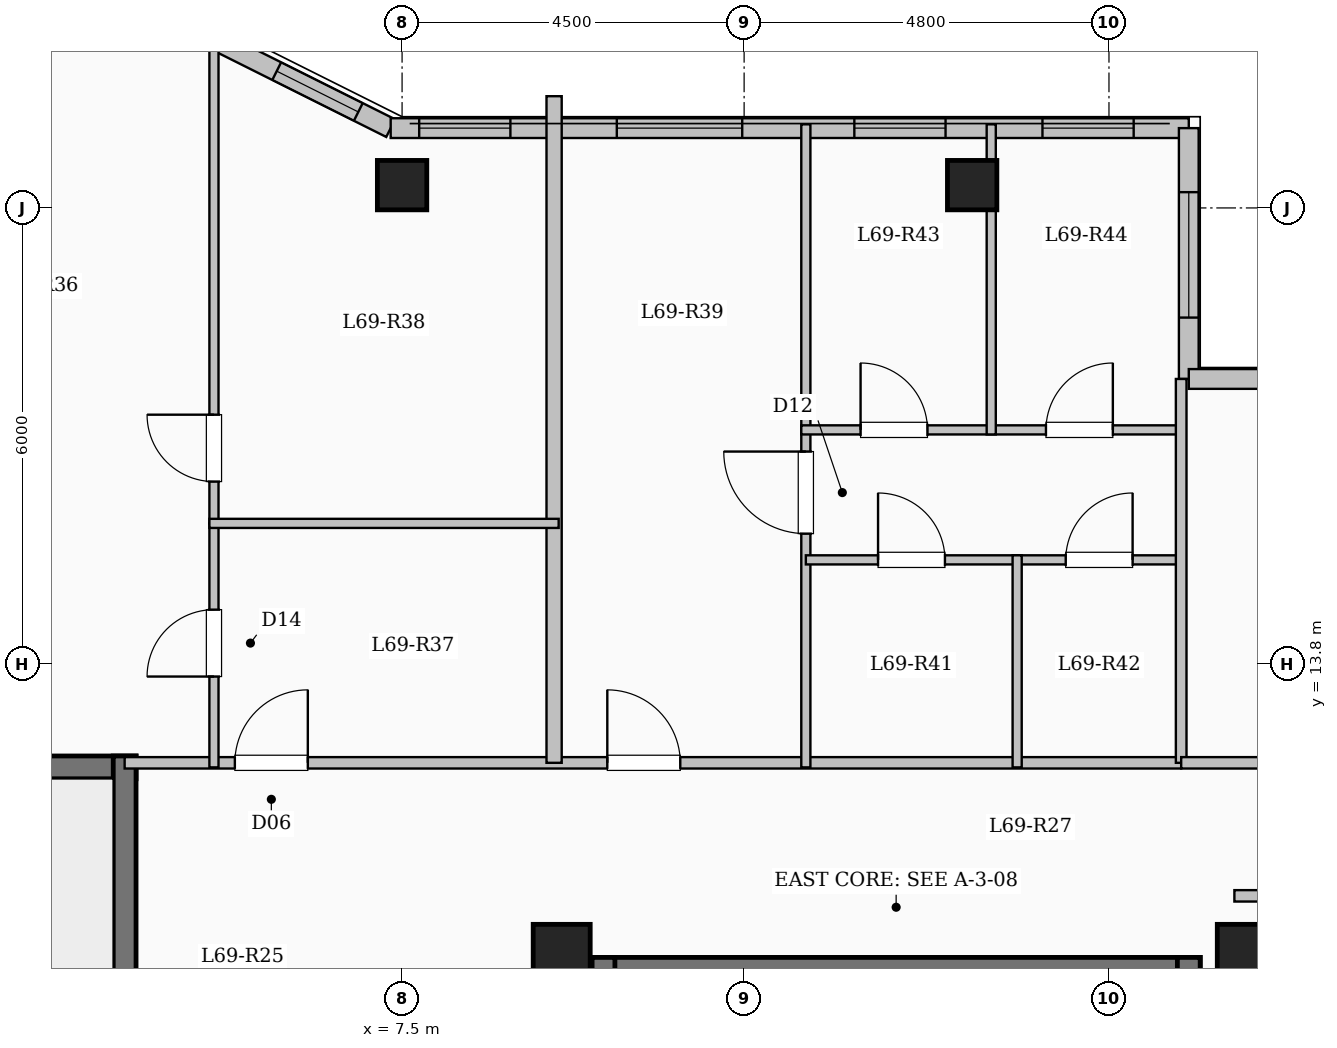
"""IFC4 building model, lengths in metres.
Left out: names, types, materials, properties, quantities, classifications, styles, units other than length and angle.
Written with IfcOpenShell. Run it as: python <this file> out.ifc"""

import sys

from ifc_helpers import new_model, si_unit, direction, frame, frame_2d, origin, origin_2d, place, context, subcontext, project, spatial, rectangle, extrude, element, fill, save


model = new_model("IFC4")
c1 = context("Model", 3, precision=1e-05, world=origin(), true_north=direction((0.0, 1.0)))
c2 = subcontext(c1, "Body", "Model", "MODEL_VIEW")
j1 = project(units=[si_unit("LENGTHUNIT", "METRE"), si_unit("PLANEANGLEUNIT", "RADIAN")], contexts=[c1])
p1 = place(None, origin())
s1 = spatial("IfcSite", under=j1, at=p1, CompositionType="ELEMENT")
p2 = place(p1, origin())
s2 = spatial("IfcBuilding", under=s1, at=p2, CompositionType="ELEMENT")
p3 = place(p2, frame((0.0, 0.0, 254.9)))
s3 = spatial("IfcBuildingStorey", under=s2, at=p3, CompositionType="ELEMENT", Elevation=254.9)
for number, where, z_axis, x_axis in (
    (1, (9.6, 10.0, 0.0), (0.0, 0.0, 1.0), (1.0, 0.0, 0.0)),
    (2, (18.6, 10.0, 0.0), (0.0, 0.0, 1.0), (1.0, 0.0, 0.0)),
):
    element("IfcColumn", number, at=place(p3, frame(where, z_axis=z_axis, x_axis=x_axis)), inside=s3, PredefinedType="COLUMN", context=c2, shape_type="SweptSolid", body=[
        extrude(rectangle(XDim=0.75, YDim=0.75, at=origin_2d()), origin(), (0.0, 0.0, 1.0), 3.35),
    ])
for number, where, z_axis, x_axis in (
    (3, (7.5, 20.1, 0.0), (0.0, 0.0, 1.0), (1.0, 0.0, 0.0)),
    (4, (15.0, 20.1, 0.0), (0.0, 0.0, 1.0), (1.0, 0.0, 0.0)),
):
    element("IfcColumn", number, at=place(p3, frame(where, z_axis=z_axis, x_axis=x_axis)), inside=s3, PredefinedType="COLUMN", context=c2, shape_type="SweptSolid", body=[
        extrude(rectangle(XDim=0.65, YDim=0.65, at=origin_2d()), origin(), (0.0, 0.0, 1.0), 3.35),
    ])
p4 = place(p3, frame((4.35, 22.35, 0.0), z_axis=(0.0, 0.0, 1.0), x_axis=(0.894427191, -0.4472135955, 0.0)))
e5 = element("IfcWall", 5, at=p4, inside=s3, PredefinedType="SOLIDWALL", context=c2, shape_type="SweptSolid", body=[
    extrude(rectangle(XDim=3.354, YDim=0.26, at=frame_2d((1.677, 0.0))), origin(), (0.0, 0.0, 1.0), 3.1),
])
p5 = place(p4, frame((1.678, 0.0, 0.95)))
e6 = element("IfcOpeningElement", 6, at=p5, cuts=e5, PredefinedType="OPENING", context=c2, shape_type="SweptSolid", body=[
    extrude(rectangle(XDim=1.2, YDim=1.5, at=frame_2d((0.6, 0.75))), frame((0.0, 0.14, 0.0), z_axis=(0.0, -1.0, 0.0), x_axis=(1.0, 0.0, 0.0)), (0.0, 0.0, 1.0), 0.28),
])
p6 = place(p3, frame((7.35, 20.85, 0.0), z_axis=(0.0, 0.0, 1.0), x_axis=(1.0, 0.0, 0.0)))
e7 = element("IfcWall", 7, at=p6, inside=s3, PredefinedType="SOLIDWALL", context=c2, shape_type="SweptSolid", body=[
    extrude(rectangle(XDim=10.5, YDim=0.26, at=frame_2d((5.25, 0.0))), origin(), (0.0, 0.0, 1.0), 3.1),
])
p7 = place(p6, frame((0.375, 0.0, 0.95)))
e8 = element("IfcOpeningElement", 8, at=p7, cuts=e7, PredefinedType="OPENING", context=c2, shape_type="SweptSolid", body=[
    extrude(rectangle(XDim=1.2, YDim=1.5, at=frame_2d((0.6, 0.75))), frame((0.0, 0.14, 0.0), z_axis=(0.0, -1.0, 0.0), x_axis=(1.0, 0.0, 0.0)), (0.0, 0.0, 1.0), 0.28),
])
p8 = place(p6, frame((2.975, 0.0, 0.9)))
e9 = element("IfcOpeningElement", 9, at=p8, cuts=e7, PredefinedType="OPENING", context=c2, shape_type="SweptSolid", body=[
    extrude(rectangle(XDim=1.65, YDim=1.6, at=frame_2d((0.825, 0.8))), frame((0.0, 0.14, 0.0), z_axis=(0.0, -1.0, 0.0), x_axis=(1.0, 0.0, 0.0)), (0.0, 0.0, 1.0), 0.28),
])
p9 = place(p6, frame((6.1, 0.0, 0.95)))
e10 = element("IfcOpeningElement", 10, at=p9, cuts=e7, PredefinedType="OPENING", context=c2, shape_type="SweptSolid", body=[
    extrude(rectangle(XDim=1.2, YDim=1.5, at=frame_2d((0.6, 0.75))), frame((0.0, 0.14, 0.0), z_axis=(0.0, -1.0, 0.0), x_axis=(1.0, 0.0, 0.0)), (0.0, 0.0, 1.0), 0.28),
])
p10 = place(p6, frame((8.575, 0.0, 0.95)))
e11 = element("IfcOpeningElement", 11, at=p10, cuts=e7, PredefinedType="OPENING", context=c2, shape_type="SweptSolid", body=[
    extrude(rectangle(XDim=1.2, YDim=1.5, at=frame_2d((0.6, 0.75))), frame((0.0, 0.14, 0.0), z_axis=(0.0, -1.0, 0.0), x_axis=(1.0, 0.0, 0.0)), (0.0, 0.0, 1.0), 0.28),
])
p11 = place(p3, frame((17.85, 20.85, 0.0), z_axis=(0.0, 0.0, 1.0), x_axis=(0.0, -1.0, 0.0)))
e12 = element("IfcWall", 12, at=p11, inside=s3, PredefinedType="SOLIDWALL", context=c2, shape_type="SweptSolid", body=[
    extrude(rectangle(XDim=3.3, YDim=0.26, at=frame_2d((1.65, 0.0))), origin(), (0.0, 0.0, 1.0), 3.1),
])
p12 = place(p11, frame((0.843, 0.0, 0.9)))
e13 = element("IfcOpeningElement", 13, at=p12, cuts=e12, PredefinedType="OPENING", context=c2, shape_type="SweptSolid", body=[
    extrude(rectangle(XDim=1.65, YDim=1.6, at=frame_2d((0.825, 0.8))), frame((0.0, 0.14, 0.0), z_axis=(0.0, -1.0, 0.0), x_axis=(1.0, 0.0, 0.0)), (0.0, 0.0, 1.0), 0.28),
])
p13 = place(p3, frame((17.85, 17.55, 0.0), z_axis=(0.0, 0.0, 1.0), x_axis=(1.0, 0.0, 0.0)))
e14 = element("IfcWall", 14, at=p13, inside=s3, PredefinedType="SOLIDWALL", context=c2, shape_type="SweptSolid", body=[
    extrude(rectangle(XDim=4.8, YDim=0.26, at=frame_2d((2.4, 0.0))), origin(), (0.0, 0.0, 1.0), 3.1),
])
p14 = place(p13, frame((1.375, 0.0, 0.9)))
e15 = element("IfcOpeningElement", 15, at=p14, cuts=e14, PredefinedType="OPENING", context=c2, shape_type="SweptSolid", body=[
    extrude(rectangle(XDim=2.0, YDim=1.7, at=frame_2d((1.0, 0.85))), frame((0.0, 0.14, 0.0), z_axis=(0.0, -1.0, 0.0), x_axis=(1.0, 0.0, 0.0)), (0.0, 0.0, 1.0), 0.28),
])
p15 = place(p3, frame((10.0, 9.79, 0.0), z_axis=(0.0, 0.0, 1.0), x_axis=(1.0, 0.0, 0.0)))
e16 = element("IfcWall", 16, at=p15, inside=s3, PredefinedType="SHEAR", context=c2, shape_type="SweptSolid", body=[
    extrude(rectangle(XDim=8.0, YDim=0.3, at=frame_2d((4.0, 0.0))), origin(), (0.0, 0.0, 1.0), 3.35),
])
for number, where, z_axis, x_axis in (
    (17, (10.15, 6.35, 0.0), (0.0, 0.0, 1.0), (0.0, 1.0, 0.0)),
    (18, (17.85, 6.35, 0.0), (0.0, 0.0, 1.0), (0.0, 1.0, 0.0)),
):
    element("IfcWall", number, at=place(p3, frame(where, z_axis=z_axis, x_axis=x_axis)), inside=s3, PredefinedType="SHEAR", context=c2, shape_type="SweptSolid", body=[
        extrude(rectangle(XDim=3.59, YDim=0.3, at=frame_2d((1.795, 0.0))), origin(), (0.0, 0.0, 1.0), 3.35),
    ])
p16 = place(p3, frame((-4.0, 12.44, 0.0), z_axis=(0.0, 0.0, 1.0), x_axis=(1.0, 0.0, 0.0)))
e19 = element("IfcWall", 19, at=p16, inside=s3, PredefinedType="SHEAR", context=c2, shape_type="SweptSolid", body=[
    extrude(rectangle(XDim=8.0, YDim=0.3, at=frame_2d((4.0, 0.0))), origin(), (0.0, 0.0, 1.0), 3.35),
])
p17 = place(p3, frame((3.85, 9.0, 0.0), z_axis=(0.0, 0.0, 1.0), x_axis=(0.0, 1.0, 0.0)))
e20 = element("IfcWall", 20, at=p17, inside=s3, PredefinedType="SHEAR", context=c2, shape_type="SweptSolid", body=[
    extrude(rectangle(XDim=3.59, YDim=0.3, at=frame_2d((1.795, 0.0))), origin(), (0.0, 0.0, 1.0), 3.35),
])
p18 = place(p3, frame((3.85, 12.5, 0.0), z_axis=(0.0, 0.0, 1.0), x_axis=(1.0, 0.0, 0.0)))
e21 = element("IfcWall", 21, at=p18, inside=s3, PredefinedType="PARTITIONING", context=c2, shape_type="SweptSolid", body=[
    extrude(rectangle(XDim=13.9, YDim=0.15, at=frame_2d((6.95, 0.0))), origin(), (0.0, 0.0, 1.0), 3.1),
])
p19 = place(p18, frame((1.45, 0.0, 0.0)))
e22 = element("IfcOpeningElement", 22, at=p19, cuts=e21, PredefinedType="OPENING", context=c2, shape_type="SweptSolid", body=[
    extrude(rectangle(XDim=0.96, YDim=2.15, at=frame_2d((0.48, 1.075))), frame((0.0, 0.085, 0.0), z_axis=(0.0, -1.0, 0.0), x_axis=(1.0, 0.0, 0.0)), (0.0, 0.0, 1.0), 0.17),
])
p20 = place(p18, frame((6.35, 0.0, 0.0)))
e23 = element("IfcOpeningElement", 23, at=p20, cuts=e21, PredefinedType="OPENING", context=c2, shape_type="SweptSolid", body=[
    extrude(rectangle(XDim=0.96, YDim=2.15, at=frame_2d((0.48, 1.075))), frame((0.0, 0.085, 0.0), z_axis=(0.0, -1.0, 0.0), x_axis=(1.0, 0.0, 0.0)), (0.0, 0.0, 1.0), 0.17),
])
p21 = place(p3, frame((9.5, 12.5, 0.0), z_axis=(0.0, 0.0, 1.0), x_axis=(0.0, 1.0, 0.0)))
e24 = element("IfcWall", 24, at=p21, inside=s3, PredefinedType="SOLIDWALL", context=c2, shape_type="SweptSolid", body=[
    extrude(rectangle(XDim=8.77, YDim=0.2, at=frame_2d((4.385, 0.0))), origin(), (0.0, 0.0, 1.0), 3.1),
])
p22 = place(p3, frame((5.025, 12.44, 0.0), z_axis=(0.0, 0.0, 1.0), x_axis=(0.0, 1.0, 0.0)))
e25 = element("IfcWall", 25, at=p22, inside=s3, PredefinedType="PARTITIONING", context=c2, shape_type="SweptSolid", body=[
    extrude(rectangle(XDim=3.21, YDim=0.12, at=frame_2d((1.605, 0.0))), origin(), (0.0, 0.0, 1.0), 3.1),
])
p23 = place(p22, frame((1.195, 0.0, 0.0)))
e26 = element("IfcOpeningElement", 26, at=p23, cuts=e25, PredefinedType="OPENING", context=c2, shape_type="SweptSolid", body=[
    extrude(rectangle(XDim=0.88, YDim=2.1, at=frame_2d((0.44, 1.05))), frame((0.0, 0.07, 0.0), z_axis=(0.0, -1.0, 0.0), x_axis=(1.0, 0.0, 0.0)), (0.0, 0.0, 1.0), 0.14),
])
p24 = place(p3, frame((5.025, 15.65, 0.0), z_axis=(0.0, 0.0, 1.0), x_axis=(0.0, 1.0, 0.0)))
e27 = element("IfcWall", 27, at=p24, inside=s3, PredefinedType="PARTITIONING", context=c2, shape_type="SweptSolid", body=[
    extrude(rectangle(XDim=6.724, YDim=0.12, at=frame_2d((3.362, 0.0))), origin(), (0.0, 0.0, 1.0), 3.1),
])
p25 = place(p24, frame((0.55, 0.0, 0.0)))
e28 = element("IfcOpeningElement", 28, at=p25, cuts=e27, PredefinedType="OPENING", context=c2, shape_type="SweptSolid", body=[
    extrude(rectangle(XDim=0.88, YDim=2.1, at=frame_2d((0.44, 1.05))), frame((0.0, 0.07, 0.0), z_axis=(0.0, -1.0, 0.0), x_axis=(1.0, 0.0, 0.0)), (0.0, 0.0, 1.0), 0.14),
])
p26 = place(p3, frame((4.965, 15.65, 0.0), z_axis=(0.0, 0.0, 1.0), x_axis=(1.0, 0.0, 0.0)))
e29 = element("IfcWall", 29, at=p26, inside=s3, PredefinedType="PARTITIONING", context=c2, shape_type="SweptSolid", body=[
    extrude(rectangle(XDim=4.595, YDim=0.12, at=frame_2d((2.297, 0.0))), origin(), (0.0, 0.0, 1.0), 2.785),
])
p27 = place(p3, frame((12.812, 12.44, 0.0), z_axis=(0.0, 0.0, 1.0), x_axis=(0.0, 1.0, 0.0)))
e30 = element("IfcWall", 30, at=p27, inside=s3, PredefinedType="PARTITIONING", context=c2, shape_type="SweptSolid", body=[
    extrude(rectangle(XDim=8.46, YDim=0.12, at=frame_2d((4.23, 0.0))), origin(), (0.0, 0.0, 1.0), 3.1),
])
p28 = place(p27, frame((3.075, 0.0, 0.0)))
e31 = element("IfcOpeningElement", 31, at=p28, cuts=e30, PredefinedType="OPENING", context=c2, shape_type="SweptSolid", body=[
    extrude(rectangle(XDim=1.08, YDim=2.15, at=frame_2d((0.54, 1.075))), frame((0.0, 0.07, 0.0), z_axis=(0.0, -1.0, 0.0), x_axis=(1.0, 0.0, 0.0)), (0.0, 0.0, 1.0), 0.14),
])
p29 = place(p3, frame((12.812, 15.17, 0.0), z_axis=(0.0, 0.0, 1.0), x_axis=(1.0, 0.0, 0.0)))
e32 = element("IfcWall", 32, at=p29, inside=s3, PredefinedType="PARTITIONING", context=c2, shape_type="SweptSolid", body=[
    extrude(rectangle(XDim=2.78, YDim=0.12, at=frame_2d((1.39, 0.0))), origin(), (0.0, 0.0, 1.0), 3.1),
])
p30 = place(p29, frame((0.95, 0.0, 0.0)))
e33 = element("IfcOpeningElement", 33, at=p30, cuts=e32, PredefinedType="OPENING", context=c2, shape_type="SweptSolid", body=[
    extrude(rectangle(XDim=0.88, YDim=2.1, at=frame_2d((0.44, 1.05))), frame((0.0, 0.07, 0.0), z_axis=(0.0, -1.0, 0.0), x_axis=(1.0, 0.0, 0.0)), (0.0, 0.0, 1.0), 0.14),
])
p31 = place(p3, frame((15.592, 15.17, 0.0), z_axis=(0.0, 0.0, 1.0), x_axis=(1.0, 0.0, 0.0)))
e34 = element("IfcWall", 34, at=p31, inside=s3, PredefinedType="PARTITIONING", context=c2, shape_type="SweptSolid", body=[
    extrude(rectangle(XDim=2.158, YDim=0.12, at=frame_2d((1.079, 0.0))), origin(), (0.0, 0.0, 1.0), 3.1),
])
p32 = place(p31, frame((0.639, 0.0, 0.0)))
e35 = element("IfcOpeningElement", 35, at=p32, cuts=e34, PredefinedType="OPENING", context=c2, shape_type="SweptSolid", body=[
    extrude(rectangle(XDim=0.88, YDim=2.1, at=frame_2d((0.44, 1.05))), frame((0.0, 0.07, 0.0), z_axis=(0.0, -1.0, 0.0), x_axis=(1.0, 0.0, 0.0)), (0.0, 0.0, 1.0), 0.14),
])
p33 = place(p3, frame((12.752, 16.88, 0.0), z_axis=(0.0, 0.0, 1.0), x_axis=(1.0, 0.0, 0.0)))
e36 = element("IfcWall", 36, at=p33, inside=s3, PredefinedType="PARTITIONING", context=c2, shape_type="SweptSolid", body=[
    extrude(rectangle(XDim=5.058, YDim=0.12, at=frame_2d((2.529, 0.0))), origin(), (0.0, 0.0, 1.0), 2.785),
])
p34 = place(p33, frame((0.78, 0.0, 0.0)))
e37 = element("IfcOpeningElement", 37, at=p34, cuts=e36, PredefinedType="OPENING", context=c2, shape_type="SweptSolid", body=[
    extrude(rectangle(XDim=0.88, YDim=2.1, at=frame_2d((0.44, 1.05))), frame((0.0, 0.07, 0.0), z_axis=(0.0, -1.0, 0.0), x_axis=(1.0, 0.0, 0.0)), (0.0, 0.0, 1.0), 0.14),
])
p35 = place(p33, frame((3.219, 0.0, 0.0)))
e38 = element("IfcOpeningElement", 38, at=p35, cuts=e36, PredefinedType="OPENING", context=c2, shape_type="SweptSolid", body=[
    extrude(rectangle(XDim=0.88, YDim=2.1, at=frame_2d((0.44, 1.05))), frame((0.0, 0.07, 0.0), z_axis=(0.0, -1.0, 0.0), x_axis=(1.0, 0.0, 0.0)), (0.0, 0.0, 1.0), 0.14),
])
p36 = place(p3, frame((15.592, 12.44, 0.0), z_axis=(0.0, 0.0, 1.0), x_axis=(0.0, 1.0, 0.0)))
e39 = element("IfcWall", 39, at=p36, inside=s3, PredefinedType="PARTITIONING", context=c2, shape_type="SweptSolid", body=[
    extrude(rectangle(XDim=2.79, YDim=0.12, at=frame_2d((1.395, 0.0))), origin(), (0.0, 0.0, 1.0), 3.1),
])
p37 = place(p3, frame((15.251, 16.82, 0.0), z_axis=(0.0, 0.0, 1.0), x_axis=(0.0, 1.0, 0.0)))
e40 = element("IfcWall", 40, at=p37, inside=s3, PredefinedType="PARTITIONING", context=c2, shape_type="SweptSolid", body=[
    extrude(rectangle(XDim=4.08, YDim=0.12, at=frame_2d((2.04, 0.0))), origin(), (0.0, 0.0, 1.0), 2.685),
])
p38 = place(p3, frame((18.45, 10.75, 0.0), z_axis=(0.0, 0.0, 1.0), x_axis=(1.0, 0.0, 0.0)))
e41 = element("IfcWall", 41, at=p38, inside=s3, PredefinedType="PARTITIONING", context=c2, shape_type="SweptSolid", body=[
    extrude(rectangle(XDim=4.23, YDim=0.15, at=frame_2d((2.115, 0.0))), origin(), (0.0, 0.0, 1.0), 3.1),
])
p39 = place(p3, frame((17.75, 12.5, 0.0), z_axis=(0.0, 0.0, 1.0), x_axis=(0.0, 1.0, 0.0)))
e42 = element("IfcWall", 42, at=p39, inside=s3, PredefinedType="PARTITIONING", context=c2, shape_type="SweptSolid", body=[
    extrude(rectangle(XDim=5.05, YDim=0.14, at=frame_2d((2.525, 0.0))), origin(), (0.0, 0.0, 1.0), 3.1),
])
p40 = place(p3, frame((17.75, 12.5, 0.0), z_axis=(0.0, 0.0, 1.0), x_axis=(1.0, 0.0, 0.0)))
e43 = element("IfcWall", 43, at=p40, inside=s3, PredefinedType="PARTITIONING", context=c2, shape_type="SweptSolid", body=[
    extrude(rectangle(XDim=4.93, YDim=0.15, at=frame_2d((2.465, 0.0))), origin(), (0.0, 0.0, 1.0), 3.1),
])
p41 = place(p40, frame((1.99, 0.0, 0.0)))
e44 = element("IfcOpeningElement", 44, at=p41, cuts=e43, PredefinedType="OPENING", context=c2, shape_type="SweptSolid", body=[
    extrude(rectangle(XDim=0.95, YDim=2.15, at=frame_2d((0.475, 1.075))), frame((0.0, 0.085, 0.0), z_axis=(0.0, -1.0, 0.0), x_axis=(1.0, 0.0, 0.0)), (0.0, 0.0, 1.0), 0.17),
])
p42 = place(p5, origin())
e45 = element("IfcWindow", 45, at=p42, inside=s3, PartitioningType="SINGLE_PANEL", PredefinedType="WINDOW", context=c2, shape_type="SweptSolid", body=[
    extrude(rectangle(XDim=1.2, YDim=1.5, at=frame_2d((0.6, 0.75))), frame((0.0, 0.03, 0.0), z_axis=(0.0, -1.0, 0.0), x_axis=(1.0, 0.0, 0.0)), (0.0, 0.0, 1.0), 0.06),
])
fill(e6, e45)
p43 = place(p7, origin())
e46 = element("IfcWindow", 46, at=p43, inside=s3, PartitioningType="SINGLE_PANEL", PredefinedType="WINDOW", context=c2, shape_type="SweptSolid", body=[
    extrude(rectangle(XDim=1.2, YDim=1.5, at=frame_2d((0.6, 0.75))), frame((0.0, 0.03, 0.0), z_axis=(0.0, -1.0, 0.0), x_axis=(1.0, 0.0, 0.0)), (0.0, 0.0, 1.0), 0.06),
])
fill(e8, e46)
p44 = place(p8, origin())
e47 = element("IfcWindow", 47, at=p44, inside=s3, PartitioningType="SINGLE_PANEL", PredefinedType="WINDOW", context=c2, shape_type="SweptSolid", body=[
    extrude(rectangle(XDim=1.65, YDim=1.6, at=frame_2d((0.825, 0.8))), frame((0.0, 0.03, 0.0), z_axis=(0.0, -1.0, 0.0), x_axis=(1.0, 0.0, 0.0)), (0.0, 0.0, 1.0), 0.06),
])
fill(e9, e47)
p45 = place(p9, origin())
e48 = element("IfcWindow", 48, at=p45, inside=s3, PartitioningType="SINGLE_PANEL", PredefinedType="WINDOW", context=c2, shape_type="SweptSolid", body=[
    extrude(rectangle(XDim=1.2, YDim=1.5, at=frame_2d((0.6, 0.75))), frame((0.0, 0.03, 0.0), z_axis=(0.0, -1.0, 0.0), x_axis=(1.0, 0.0, 0.0)), (0.0, 0.0, 1.0), 0.06),
])
fill(e10, e48)
p46 = place(p10, origin())
e49 = element("IfcWindow", 49, at=p46, inside=s3, PartitioningType="SINGLE_PANEL", PredefinedType="WINDOW", context=c2, shape_type="SweptSolid", body=[
    extrude(rectangle(XDim=1.2, YDim=1.5, at=frame_2d((0.6, 0.75))), frame((0.0, 0.03, 0.0), z_axis=(0.0, -1.0, 0.0), x_axis=(1.0, 0.0, 0.0)), (0.0, 0.0, 1.0), 0.06),
])
fill(e11, e49)
p47 = place(p12, origin())
e50 = element("IfcWindow", 50, at=p47, inside=s3, PartitioningType="SINGLE_PANEL", PredefinedType="WINDOW", context=c2, shape_type="SweptSolid", body=[
    extrude(rectangle(XDim=1.65, YDim=1.6, at=frame_2d((0.825, 0.8))), frame((0.0, 0.03, 0.0), z_axis=(0.0, -1.0, 0.0), x_axis=(1.0, 0.0, 0.0)), (0.0, 0.0, 1.0), 0.06),
])
fill(e13, e50)
p48 = place(p19, origin())
e51 = element("IfcDoor", 51, at=p48, inside=s3, OperationType="SINGLE_SWING_RIGHT", PredefinedType="DOOR", context=c2, shape_type="SweptSolid", body=[
    extrude(rectangle(XDim=0.96, YDim=2.15, at=frame_2d((0.48, 1.075))), frame((0.0, 0.025, 0.0), z_axis=(0.0, -1.0, 0.0), x_axis=(1.0, 0.0, 0.0)), (0.0, 0.0, 1.0), 0.05),
])
fill(e22, e51)
p49 = place(p23, origin())
e52 = element("IfcDoor", 52, at=p49, inside=s3, OperationType="SINGLE_SWING_LEFT", PredefinedType="DOOR", context=c2, shape_type="SweptSolid", body=[
    extrude(rectangle(XDim=0.88, YDim=2.1, at=frame_2d((0.44, 1.05))), frame((0.0, 0.025, 0.0), z_axis=(0.0, -1.0, 0.0), x_axis=(1.0, 0.0, 0.0)), (0.0, 0.0, 1.0), 0.05),
])
fill(e26, e52)
p50 = place(p25, origin())
e53 = element("IfcDoor", 53, at=p50, inside=s3, OperationType="SINGLE_SWING_RIGHT", PredefinedType="DOOR", context=c2, shape_type="SweptSolid", body=[
    extrude(rectangle(XDim=0.88, YDim=2.1, at=frame_2d((0.44, 1.05))), frame((0.0, 0.025, 0.0), z_axis=(0.0, -1.0, 0.0), x_axis=(1.0, 0.0, 0.0)), (0.0, 0.0, 1.0), 0.05),
])
fill(e28, e53)
p51 = place(p20, origin())
e54 = element("IfcDoor", 54, at=p51, inside=s3, OperationType="SINGLE_SWING_LEFT", PredefinedType="DOOR", context=c2, shape_type="SweptSolid", body=[
    extrude(rectangle(XDim=0.96, YDim=2.15, at=frame_2d((0.48, 1.075))), frame((0.0, 0.025, 0.0), z_axis=(0.0, -1.0, 0.0), x_axis=(1.0, 0.0, 0.0)), (0.0, 0.0, 1.0), 0.05),
])
fill(e23, e54)
p52 = place(p28, origin())
e55 = element("IfcDoor", 55, at=p52, inside=s3, OperationType="SINGLE_SWING_RIGHT", PredefinedType="DOOR", context=c2, shape_type="SweptSolid", body=[
    extrude(rectangle(XDim=1.08, YDim=2.15, at=frame_2d((0.54, 1.075))), frame((0.0, 0.025, 0.0), z_axis=(0.0, -1.0, 0.0), x_axis=(1.0, 0.0, 0.0)), (0.0, 0.0, 1.0), 0.05),
])
fill(e31, e55)
p53 = place(p30, origin())
e56 = element("IfcDoor", 56, at=p53, inside=s3, OperationType="SINGLE_SWING_LEFT", PredefinedType="DOOR", context=c2, shape_type="SweptSolid", body=[
    extrude(rectangle(XDim=0.88, YDim=2.1, at=frame_2d((0.44, 1.05))), frame((0.0, 0.025, 0.0), z_axis=(0.0, -1.0, 0.0), x_axis=(1.0, 0.0, 0.0)), (0.0, 0.0, 1.0), 0.05),
])
fill(e33, e56)
p54 = place(p32, origin())
e57 = element("IfcDoor", 57, at=p54, inside=s3, OperationType="SINGLE_SWING_RIGHT", PredefinedType="DOOR", context=c2, shape_type="SweptSolid", body=[
    extrude(rectangle(XDim=0.88, YDim=2.1, at=frame_2d((0.44, 1.05))), frame((0.0, 0.025, 0.0), z_axis=(0.0, -1.0, 0.0), x_axis=(1.0, 0.0, 0.0)), (0.0, 0.0, 1.0), 0.05),
])
fill(e35, e57)
p55 = place(p34, origin())
e58 = element("IfcDoor", 58, at=p55, inside=s3, OperationType="SINGLE_SWING_LEFT", PredefinedType="DOOR", context=c2, shape_type="SweptSolid", body=[
    extrude(rectangle(XDim=0.88, YDim=2.1, at=frame_2d((0.44, 1.05))), frame((0.0, 0.025, 0.0), z_axis=(0.0, -1.0, 0.0), x_axis=(1.0, 0.0, 0.0)), (0.0, 0.0, 1.0), 0.05),
])
fill(e37, e58)
p56 = place(p35, origin())
e59 = element("IfcDoor", 59, at=p56, inside=s3, OperationType="SINGLE_SWING_RIGHT", PredefinedType="DOOR", context=c2, shape_type="SweptSolid", body=[
    extrude(rectangle(XDim=0.88, YDim=2.1, at=frame_2d((0.44, 1.05))), frame((0.0, 0.025, 0.0), z_axis=(0.0, -1.0, 0.0), x_axis=(1.0, 0.0, 0.0)), (0.0, 0.0, 1.0), 0.05),
])
fill(e38, e59)
save(model, sys.argv[1])
